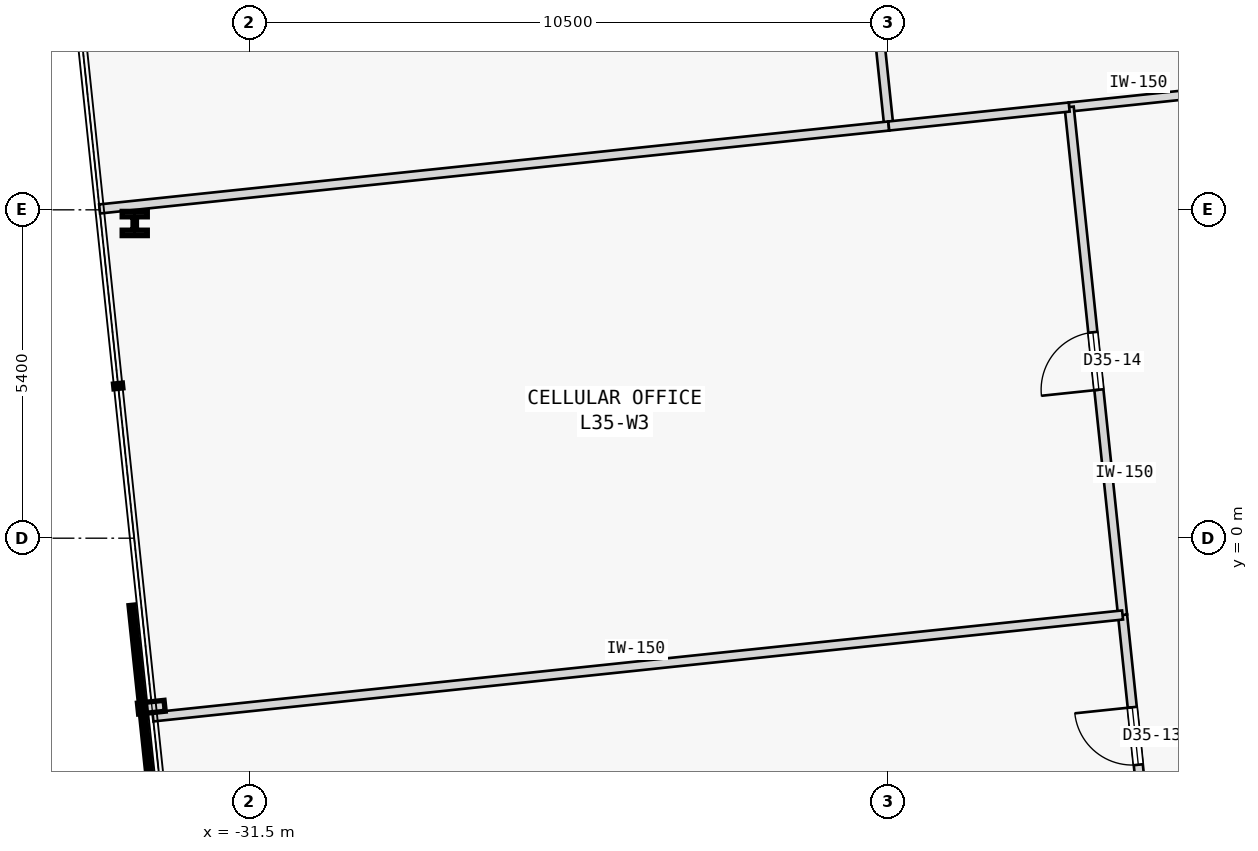
"""IFC4 building model, lengths in metres.
Left out: names, types, materials, properties, quantities, classifications, styles, units other than length and angle.
Written with IfcOpenShell. Run it as: python <this file> out.ifc"""

import sys

from ifc_helpers import new_model, si_unit, direction, frame, frame_2d, origin, origin_2d, place, context, subcontext, project, spatial, rectangle, i_section, extrude, element, fill, save


model = new_model("IFC4")
c1 = context("Model", 3, precision=1e-05, world=origin(), true_north=direction((0.0, 1.0)))
c2 = subcontext(c1, "Body", "Model", "MODEL_VIEW")
j1 = project(units=[si_unit("LENGTHUNIT", "METRE"), si_unit("PLANEANGLEUNIT", "RADIAN")], contexts=[c1])
p1 = place(None, origin())
s1 = spatial("IfcSite", under=j1, at=p1, CompositionType="ELEMENT")
p2 = place(p1, origin())
s2 = spatial("IfcBuilding", under=s1, at=p2, CompositionType="ELEMENT")
p3 = place(p2, frame((0.0, 0.0, 139.2)))
s3 = spatial("IfcBuildingStorey", under=s2, at=p3, CompositionType="ELEMENT", Elevation=139.2)
p4 = place(p3, frame((-33.388, 5.175, 0.0), z_axis=(0.0, 0.0, 1.0), x_axis=(1.0, 0.0, 0.0)))
e1 = element("IfcColumn", 1, at=p4, inside=s3, PredefinedType="COLUMN", context=c2, shape_type="SweptSolid", body=[
    extrude(i_section(OverallWidth=0.413, OverallDepth=0.398, WebThickness=0.056, FlangeThickness=0.089, FilletRadius=0.015, at=origin_2d()), origin(), (0.0, 0.0, 1.0), 3.7),
])
p5 = place(p3, frame((-18.021, 7.09, 0.0), z_axis=(0.0, 0.0, 1.0), x_axis=(0.994522183983, 0.104525717249, 0.0)))
e2 = element("IfcWall", 2, at=p5, inside=s3, PredefinedType="PARTITIONING", context=c2, shape_type="SweptSolid", body=[
    extrude(rectangle(XDim=10.067, YDim=0.15, at=frame_2d((5.033, 0.0))), origin(), (0.0, 0.0, 1.0), 3.3),
])
p6 = place(p5, frame((4.559, 0.0, 0.0)))
e3 = element("IfcOpeningElement", 3, at=p6, cuts=e2, PredefinedType="OPENING", context=c2, shape_type="SweptSolid", body=[
    extrude(rectangle(XDim=0.95, YDim=2.15, at=frame_2d((0.475, 1.075))), frame((0.0, 0.085, 0.0), z_axis=(0.0, -1.0, 0.0), x_axis=(1.0, 0.0, 0.0)), (0.0, 0.0, 1.0), 0.17),
])
p7 = place(p3, frame((-16.546, -6.949, 0.0), z_axis=(0.0, 0.0, 1.0), x_axis=(-0.104520314957, 0.994522751756, 0.0)))
e4 = element("IfcWall", 4, at=p7, inside=s3, PredefinedType="PARTITIONING", context=c2, shape_type="SweptSolid", body=[
    extrude(rectangle(XDim=5.718, YDim=0.15, at=frame_2d((2.859, 0.0))), origin(), (0.0, 0.0, 1.0), 3.3),
])
p8 = place(p7, frame((3.242, 0.0, 0.0)))
e5 = element("IfcOpeningElement", 5, at=p8, cuts=e4, PredefinedType="OPENING", context=c2, shape_type="SweptSolid", body=[
    extrude(rectangle(XDim=0.95, YDim=2.15, at=frame_2d((0.475, 1.075))), frame((0.0, 0.085, 0.0), z_axis=(0.0, -1.0, 0.0), x_axis=(1.0, 0.0, 0.0)), (0.0, 0.0, 1.0), 0.17),
])
p9 = place(p3, frame((-17.143, -1.263, 0.0), z_axis=(0.0, 0.0, 1.0), x_axis=(-0.104527419485, 0.994522005074, 0.0)))
e6 = element("IfcWall", 6, at=p9, inside=s3, PredefinedType="PARTITIONING", context=c2, shape_type="SweptSolid", body=[
    extrude(rectangle(XDim=8.399, YDim=0.15, at=frame_2d((4.199, 0.0))), origin(), (0.0, 0.0, 1.0), 3.3),
])
p10 = place(p9, frame((3.725, 0.0, 0.0)))
e7 = element("IfcOpeningElement", 7, at=p10, cuts=e6, PredefinedType="OPENING", context=c2, shape_type="SweptSolid", body=[
    extrude(rectangle(XDim=0.95, YDim=2.15, at=frame_2d((0.475, 1.075))), frame((0.0, 0.085, 0.0), z_axis=(0.0, -1.0, 0.0), x_axis=(1.0, 0.0, 0.0)), (0.0, 0.0, 1.0), 0.17),
])
p11 = place(p3, frame((-20.988, 6.779, 0.0), z_axis=(0.0, 0.0, 1.0), x_axis=(-0.104521364336, 0.99452264147, 0.0)))
e8 = element("IfcWall", 8, at=p11, inside=s3, PredefinedType="PARTITIONING", context=c2, shape_type="SweptSolid", body=[
    extrude(rectangle(XDim=16.409, YDim=0.15, at=frame_2d((8.205, 0.0))), origin(), (0.0, 0.0, 1.0), 3.3),
])
p12 = place(p11, frame((7.729, 0.0, 0.0)))
e9 = element("IfcOpeningElement", 9, at=p12, cuts=e8, PredefinedType="OPENING", context=c2, shape_type="SweptSolid", body=[
    extrude(rectangle(XDim=0.95, YDim=2.15, at=frame_2d((0.475, 1.075))), frame((0.0, 0.085, 0.0), z_axis=(0.0, -1.0, 0.0), x_axis=(1.0, 0.0, 0.0)), (0.0, 0.0, 1.0), 0.17),
])
p13 = place(p3, frame((-33.967, 5.414, 0.0), z_axis=(0.0, 0.0, 1.0), x_axis=(0.994520613947, 0.104540654453, 0.0)))
e10 = element("IfcWall", 10, at=p13, inside=s3, PredefinedType="PARTITIONING", context=c2, shape_type="SweptSolid", body=[
    extrude(rectangle(XDim=13.05, YDim=0.15, at=frame_2d((6.525, 0.0))), origin(), (0.0, 0.0, 1.0), 3.3),
])
p14 = place(p3, frame((-20.988, 6.779, 0.0), z_axis=(0.0, 0.0, 1.0), x_axis=(0.994523823632, 0.104510115436, 0.0)))
e11 = element("IfcWall", 11, at=p14, inside=s3, PredefinedType="PARTITIONING", context=c2, shape_type="SweptSolid", body=[
    extrude(rectangle(XDim=2.983, YDim=0.15, at=frame_2d((1.492, 0.0))), origin(), (0.0, 0.0, 1.0), 3.3),
])
p15 = place(p3, frame((-33.089, -2.939, 0.0), z_axis=(0.0, 0.0, 1.0), x_axis=(0.994521211213, 0.104534972363, 0.0)))
e12 = element("IfcWall", 12, at=p15, inside=s3, PredefinedType="PARTITIONING", context=c2, shape_type="SweptSolid", body=[
    extrude(rectangle(XDim=16.033, YDim=0.15, at=frame_2d((8.017, 0.0))), origin(), (0.0, 0.0, 1.0), 3.3),
])
p16 = place(p8, origin())
e13 = element("IfcDoor", 13, at=p16, inside=s3, OperationType="SINGLE_SWING_RIGHT", PredefinedType="DOOR", context=c2, shape_type="SweptSolid", body=[
    extrude(rectangle(XDim=0.95, YDim=2.15, at=frame_2d((0.475, 1.075))), frame((0.0, 0.025, 0.0), z_axis=(0.0, -1.0, 0.0), x_axis=(1.0, 0.0, 0.0)), (0.0, 0.0, 1.0), 0.05),
])
fill(e5, e13)
p17 = place(p10, origin())
e14 = element("IfcDoor", 14, at=p17, inside=s3, OperationType="SINGLE_SWING_LEFT", PredefinedType="DOOR", context=c2, shape_type="SweptSolid", body=[
    extrude(rectangle(XDim=0.95, YDim=2.15, at=frame_2d((0.475, 1.075))), frame((0.0, 0.025, 0.0), z_axis=(0.0, -1.0, 0.0), x_axis=(1.0, 0.0, 0.0)), (0.0, 0.0, 1.0), 0.05),
])
fill(e7, e14)
save(model, sys.argv[1])
